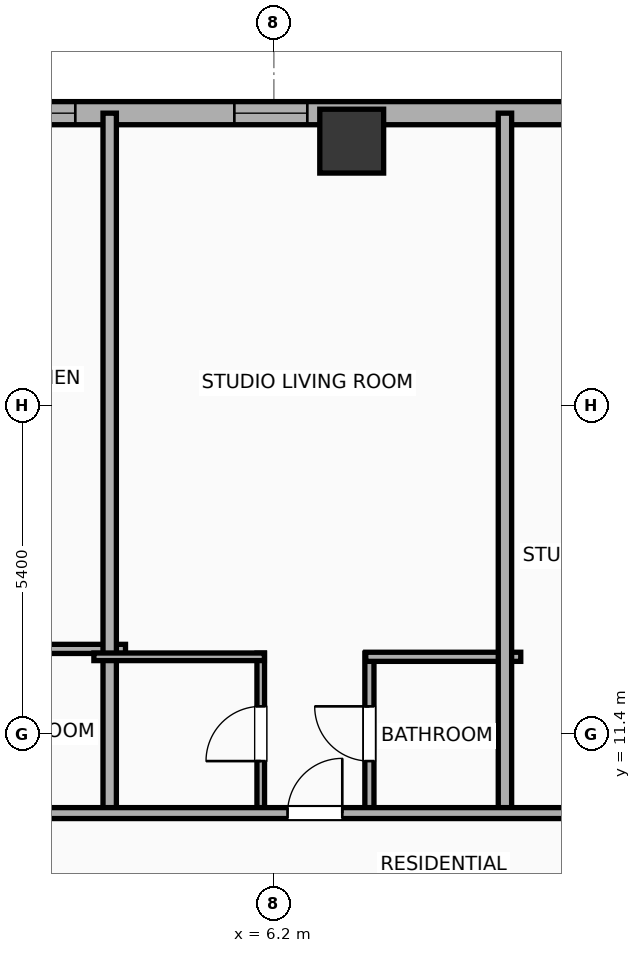
"""IFC4 building model, lengths in metres.
Left out: names, types, materials, properties, quantities, classifications, styles, units other than length and angle.
Written with IfcOpenShell. Run it as: python <this file> out.ifc"""

import sys

from ifc_helpers import new_model, si_unit, direction, frame, frame_2d, origin, origin_2d, place, context, subcontext, project, spatial, rectangle, hollow_rectangle, extrude, element, fill, save


model = new_model("IFC4")
c1 = context("Model", 3, precision=1e-05, world=origin(), true_north=direction((0.0, 1.0)))
c2 = subcontext(c1, "Body", "Model", "MODEL_VIEW")
j1 = project(units=[si_unit("LENGTHUNIT", "METRE"), si_unit("PLANEANGLEUNIT", "RADIAN")], contexts=[c1])
p1 = place(None, origin())
s1 = spatial("IfcSite", under=j1, at=p1, CompositionType="ELEMENT")
p2 = place(p1, origin())
s2 = spatial("IfcBuilding", under=s1, at=p2, CompositionType="ELEMENT")
p3 = place(p2, frame((0.0, 0.0, 128.7)))
s3 = spatial("IfcBuildingStorey", under=s2, at=p3, CompositionType="ELEMENT", Elevation=128.7)
p4 = place(p3, frame((7.48, 21.15, 0.0), z_axis=(0.0, 0.0, 1.0), x_axis=(1.0, 0.0, 0.0)))
e1 = element("IfcColumn", 1, at=p4, inside=s3, PredefinedType="COLUMN", context=c2, shape_type="SweptSolid", body=[
    extrude(hollow_rectangle(XDim=1.05, YDim=1.05, WallThickness=0.036, at=origin_2d()), origin(), (0.0, 0.0, 1.0), 3.9),
])
p5 = place(p3, frame((-25.381, 21.61, 0.0), z_axis=(0.0, 0.0, 1.0), x_axis=(1.0, 0.0, 0.0)))
e2 = element("IfcWall", 2, at=p5, inside=s3, PredefinedType="ELEMENTEDWALL", context=c2, shape_type="SweptSolid", body=[
    extrude(rectangle(XDim=54.763, YDim=0.38, at=frame_2d((27.381, 0.0))), origin(), (0.0, 0.0, 1.0), 3.65),
])
p6 = place(p5, frame((5.645, 0.0, 0.75)))
e3 = element("IfcOpeningElement", 3, at=p6, cuts=e2, PredefinedType="OPENING", context=c2, shape_type="SweptSolid", body=[
    extrude(rectangle(XDim=2.4, YDim=2.1, at=frame_2d((1.2, 1.05))), frame((0.0, 0.2, 0.0), z_axis=(0.0, -1.0, 0.0), x_axis=(1.0, 0.0, 0.0)), (0.0, 0.0, 1.0), 0.4),
])
p7 = place(p5, frame((45.067, 0.0, 0.75)))
e4 = element("IfcOpeningElement", 4, at=p7, cuts=e2, PredefinedType="OPENING", context=c2, shape_type="SweptSolid", body=[
    extrude(rectangle(XDim=2.4, YDim=2.1, at=frame_2d((1.2, 1.05))), frame((0.0, 0.2, 0.0), z_axis=(0.0, -1.0, 0.0), x_axis=(1.0, 0.0, 0.0)), (0.0, 0.0, 1.0), 0.4),
])
p8 = place(p5, frame((1.286, 0.0, 0.75)))
e5 = element("IfcOpeningElement", 5, at=p8, cuts=e2, PredefinedType="OPENING", context=c2, shape_type="SweptSolid", body=[
    extrude(rectangle(XDim=1.2, YDim=2.05, at=frame_2d((0.6, 1.025))), frame((0.0, 0.2, 0.0), z_axis=(0.0, -1.0, 0.0), x_axis=(1.0, 0.0, 0.0)), (0.0, 0.0, 1.0), 0.4),
])
p9 = place(p5, frame((3.501, 0.0, 0.75)))
e6 = element("IfcOpeningElement", 6, at=p9, cuts=e2, PredefinedType="OPENING", context=c2, shape_type="SweptSolid", body=[
    extrude(rectangle(XDim=1.2, YDim=2.05, at=frame_2d((0.6, 1.025))), frame((0.0, 0.2, 0.0), z_axis=(0.0, -1.0, 0.0), x_axis=(1.0, 0.0, 0.0)), (0.0, 0.0, 1.0), 0.4),
])
p10 = place(p5, frame((12.031, 0.0, 0.75)))
e7 = element("IfcOpeningElement", 7, at=p10, cuts=e2, PredefinedType="OPENING", context=c2, shape_type="SweptSolid", body=[
    extrude(rectangle(XDim=1.2, YDim=2.05, at=frame_2d((0.6, 1.025))), frame((0.0, 0.2, 0.0), z_axis=(0.0, -1.0, 0.0), x_axis=(1.0, 0.0, 0.0)), (0.0, 0.0, 1.0), 0.4),
])
p11 = place(p5, frame((19.805, 0.0, 0.75)))
e8 = element("IfcOpeningElement", 8, at=p11, cuts=e2, PredefinedType="OPENING", context=c2, shape_type="SweptSolid", body=[
    extrude(rectangle(XDim=1.2, YDim=2.05, at=frame_2d((0.6, 1.025))), frame((0.0, 0.2, 0.0), z_axis=(0.0, -1.0, 0.0), x_axis=(1.0, 0.0, 0.0)), (0.0, 0.0, 1.0), 0.4),
])
p12 = place(p5, frame((16.555, 0.0, 0.75)))
e9 = element("IfcOpeningElement", 9, at=p12, cuts=e2, PredefinedType="OPENING", context=c2, shape_type="SweptSolid", body=[
    extrude(rectangle(XDim=1.2, YDim=2.05, at=frame_2d((0.6, 1.025))), frame((0.0, 0.2, 0.0), z_axis=(0.0, -1.0, 0.0), x_axis=(1.0, 0.0, 0.0)), (0.0, 0.0, 1.0), 0.4),
])
p13 = place(p5, frame((23.866, 0.0, 0.75)))
e10 = element("IfcOpeningElement", 10, at=p13, cuts=e2, PredefinedType="OPENING", context=c2, shape_type="SweptSolid", body=[
    extrude(rectangle(XDim=1.2, YDim=2.05, at=frame_2d((0.6, 1.025))), frame((0.0, 0.2, 0.0), z_axis=(0.0, -1.0, 0.0), x_axis=(1.0, 0.0, 0.0)), (0.0, 0.0, 1.0), 0.4),
])
p14 = place(p5, frame((27.116, 0.0, 0.75)))
e11 = element("IfcOpeningElement", 11, at=p14, cuts=e2, PredefinedType="OPENING", context=c2, shape_type="SweptSolid", body=[
    extrude(rectangle(XDim=1.2, YDim=2.05, at=frame_2d((0.6, 1.025))), frame((0.0, 0.2, 0.0), z_axis=(0.0, -1.0, 0.0), x_axis=(1.0, 0.0, 0.0)), (0.0, 0.0, 1.0), 0.4),
])
p15 = place(p5, frame((30.931, 0.0, 0.75)))
e12 = element("IfcOpeningElement", 12, at=p15, cuts=e2, PredefinedType="OPENING", context=c2, shape_type="SweptSolid", body=[
    extrude(rectangle(XDim=1.2, YDim=2.05, at=frame_2d((0.6, 1.025))), frame((0.0, 0.2, 0.0), z_axis=(0.0, -1.0, 0.0), x_axis=(1.0, 0.0, 0.0)), (0.0, 0.0, 1.0), 0.4),
])
p16 = place(p5, frame((36.811, 0.0, 0.75)))
e13 = element("IfcOpeningElement", 13, at=p16, cuts=e2, PredefinedType="OPENING", context=c2, shape_type="SweptSolid", body=[
    extrude(rectangle(XDim=1.2, YDim=2.05, at=frame_2d((0.6, 1.025))), frame((0.0, 0.2, 0.0), z_axis=(0.0, -1.0, 0.0), x_axis=(1.0, 0.0, 0.0)), (0.0, 0.0, 1.0), 0.4),
])
p17 = place(p5, frame((40.061, 0.0, 0.75)))
e14 = element("IfcOpeningElement", 14, at=p17, cuts=e2, PredefinedType="OPENING", context=c2, shape_type="SweptSolid", body=[
    extrude(rectangle(XDim=1.2, YDim=2.05, at=frame_2d((0.6, 1.025))), frame((0.0, 0.2, 0.0), z_axis=(0.0, -1.0, 0.0), x_axis=(1.0, 0.0, 0.0)), (0.0, 0.0, 1.0), 0.4),
])
p18 = place(p5, frame((50.527, 0.0, 0.75)))
e15 = element("IfcOpeningElement", 15, at=p18, cuts=e2, PredefinedType="OPENING", context=c2, shape_type="SweptSolid", body=[
    extrude(rectangle(XDim=1.2, YDim=2.05, at=frame_2d((0.6, 1.025))), frame((0.0, 0.2, 0.0), z_axis=(0.0, -1.0, 0.0), x_axis=(1.0, 0.0, 0.0)), (0.0, 0.0, 1.0), 0.4),
])
p19 = place(p3, frame((1.089, 12.8, 0.0), z_axis=(0.0, 0.0, 1.0), x_axis=(1.0, 0.0, 0.0)))
e16 = element("IfcWall", 16, at=p19, inside=s3, PredefinedType="PLUMBINGWALL", context=c2, shape_type="SweptSolid", body=[
    extrude(rectangle(XDim=2.671, YDim=0.15, at=frame_2d((1.335, 0.0))), origin(), (0.0, 0.0, 1.0), 3.65),
])
p20 = place(p3, frame((3.5, 10.02, 0.0), z_axis=(0.0, 0.0, 1.0), x_axis=(0.0, 1.0, 0.0)))
e17 = element("IfcWall", 17, at=p20, inside=s3, PredefinedType="PARTITIONING", context=c2, shape_type="SweptSolid", body=[
    extrude(rectangle(XDim=11.59, YDim=0.22, at=frame_2d((5.795, 0.0))), origin(), (0.0, 0.0, 1.0), 3.65),
])
p21 = place(p3, frame((5.984, 10.08, 0.0), z_axis=(0.0, 0.0, 1.0), x_axis=(0.0, 1.0, 0.0)))
e18 = element("IfcWall", 18, at=p21, inside=s3, PredefinedType="PARTITIONING", context=c2, shape_type="SweptSolid", body=[
    extrude(rectangle(XDim=2.65, YDim=0.125, at=frame_2d((1.325, 0.0))), origin(), (0.0, 0.0, 1.0), 3.65),
])
p22 = place(p21, frame((0.875, 0.0, 0.0)))
e19 = element("IfcOpeningElement", 19, at=p22, cuts=e18, PredefinedType="OPENING", context=c2, shape_type="SweptSolid", body=[
    extrude(rectangle(XDim=0.9, YDim=2.05, at=frame_2d((0.45, 1.025))), frame((0.0, 0.073, 0.0), z_axis=(0.0, -1.0, 0.0), x_axis=(1.0, 0.0, 0.0)), (0.0, 0.0, 1.0), 0.145),
])
p23 = place(p3, frame((7.771, 10.08, 0.0), z_axis=(0.0, 0.0, 1.0), x_axis=(0.0, 1.0, 0.0)))
e20 = element("IfcWall", 20, at=p23, inside=s3, PredefinedType="PLUMBINGWALL", context=c2, shape_type="SweptSolid", body=[
    extrude(rectangle(XDim=2.65, YDim=0.15, at=frame_2d((1.325, 0.0))), origin(), (0.0, 0.0, 1.0), 3.65),
])
p24 = place(p23, frame((0.875, 0.0, 0.0)))
e21 = element("IfcOpeningElement", 21, at=p24, cuts=e20, PredefinedType="OPENING", context=c2, shape_type="SweptSolid", body=[
    extrude(rectangle(XDim=0.9, YDim=2.05, at=frame_2d((0.45, 1.025))), frame((0.0, 0.085, 0.0), z_axis=(0.0, -1.0, 0.0), x_axis=(1.0, 0.0, 0.0)), (0.0, 0.0, 1.0), 0.17),
])
p25 = place(p3, frame((3.24, 12.67, 0.0), z_axis=(0.0, 0.0, 1.0), x_axis=(1.0, 0.0, 0.0)))
e22 = element("IfcWall", 22, at=p25, inside=s3, PredefinedType="PARTITIONING", context=c2, shape_type="SweptSolid", body=[
    extrude(rectangle(XDim=2.804, YDim=0.125, at=frame_2d((1.402, 0.0))), origin(), (0.0, 0.0, 1.0), 3.65),
])
p26 = place(p3, frame((7.711, 12.67, 0.0), z_axis=(0.0, 0.0, 1.0), x_axis=(1.0, 0.0, 0.0)))
e23 = element("IfcWall", 23, at=p26, inside=s3, PredefinedType="PLUMBINGWALL", context=c2, shape_type="SweptSolid", body=[
    extrude(rectangle(XDim=2.549, YDim=0.15, at=frame_2d((1.274, 0.0))), origin(), (0.0, 0.0, 1.0), 3.65),
])
p27 = place(p3, frame((10.0, 10.02, 0.0), z_axis=(0.0, 0.0, 1.0), x_axis=(0.0, 1.0, 0.0)))
e24 = element("IfcWall", 24, at=p27, inside=s3, PredefinedType="PARTITIONING", context=c2, shape_type="SweptSolid", body=[
    extrude(rectangle(XDim=11.59, YDim=0.22, at=frame_2d((5.795, 0.0))), origin(), (0.0, 0.0, 1.0), 3.65),
])
p28 = place(p3, frame((-29.21, 10.1, 0.0), z_axis=(0.0, 0.0, 1.0), x_axis=(1.0, 0.0, 0.0)))
e25 = element("IfcWall", 25, at=p28, inside=s3, PredefinedType="PARTITIONING", context=c2, shape_type="SweptSolid", body=[
    extrude(rectangle(XDim=62.42, YDim=0.18, at=frame_2d((31.21, 0.0))), origin(), (0.0, 0.0, 1.0), 3.65),
])
p29 = place(p28, frame((3.033, 0.0, 0.0)))
e26 = element("IfcOpeningElement", 26, at=p29, cuts=e25, PredefinedType="OPENING", context=c2, shape_type="SweptSolid", body=[
    extrude(rectangle(XDim=0.9, YDim=2.05, at=frame_2d((0.45, 1.025))), frame((0.0, 0.1, 0.0), z_axis=(0.0, -1.0, 0.0), x_axis=(1.0, 0.0, 0.0)), (0.0, 0.0, 1.0), 0.2),
])
p30 = place(p28, frame((10.573, 0.0, 0.0)))
e27 = element("IfcOpeningElement", 27, at=p30, cuts=e25, PredefinedType="OPENING", context=c2, shape_type="SweptSolid", body=[
    extrude(rectangle(XDim=1.15, YDim=2.05, at=frame_2d((0.575, 1.025))), frame((0.0, 0.1, 0.0), z_axis=(0.0, -1.0, 0.0), x_axis=(1.0, 0.0, 0.0)), (0.0, 0.0, 1.0), 0.2),
])
p31 = place(p28, frame((16.135, 0.0, 0.0)))
e28 = element("IfcOpeningElement", 28, at=p31, cuts=e25, PredefinedType="OPENING", context=c2, shape_type="SweptSolid", body=[
    extrude(rectangle(XDim=0.9, YDim=2.05, at=frame_2d((0.45, 1.025))), frame((0.0, 0.1, 0.0), z_axis=(0.0, -1.0, 0.0), x_axis=(1.0, 0.0, 0.0)), (0.0, 0.0, 1.0), 0.2),
])
p32 = place(p28, frame((23.632, 0.0, 0.0)))
e29 = element("IfcOpeningElement", 29, at=p32, cuts=e25, PredefinedType="OPENING", context=c2, shape_type="SweptSolid", body=[
    extrude(rectangle(XDim=1.15, YDim=2.05, at=frame_2d((0.575, 1.025))), frame((0.0, 0.1, 0.0), z_axis=(0.0, -1.0, 0.0), x_axis=(1.0, 0.0, 0.0)), (0.0, 0.0, 1.0), 0.2),
])
p33 = place(p28, frame((27.751, 0.0, 0.0)))
e30 = element("IfcOpeningElement", 30, at=p33, cuts=e25, PredefinedType="OPENING", context=c2, shape_type="SweptSolid", body=[
    extrude(rectangle(XDim=1.15, YDim=2.05, at=frame_2d((0.575, 1.025))), frame((0.0, 0.1, 0.0), z_axis=(0.0, -1.0, 0.0), x_axis=(1.0, 0.0, 0.0)), (0.0, 0.0, 1.0), 0.2),
])
p34 = place(p28, frame((35.635, 0.0, 0.0)))
e31 = element("IfcOpeningElement", 31, at=p34, cuts=e25, PredefinedType="OPENING", context=c2, shape_type="SweptSolid", body=[
    extrude(rectangle(XDim=0.9, YDim=2.05, at=frame_2d((0.45, 1.025))), frame((0.0, 0.1, 0.0), z_axis=(0.0, -1.0, 0.0), x_axis=(1.0, 0.0, 0.0)), (0.0, 0.0, 1.0), 0.2),
])
p35 = place(p28, frame((40.697, 0.0, 0.0)))
e32 = element("IfcOpeningElement", 32, at=p35, cuts=e25, PredefinedType="OPENING", context=c2, shape_type="SweptSolid", body=[
    extrude(rectangle(XDim=1.15, YDim=2.05, at=frame_2d((0.575, 1.025))), frame((0.0, 0.1, 0.0), z_axis=(0.0, -1.0, 0.0), x_axis=(1.0, 0.0, 0.0)), (0.0, 0.0, 1.0), 0.2),
])
p36 = place(p28, frame((48.637, 0.0, 0.0)))
e33 = element("IfcOpeningElement", 33, at=p36, cuts=e25, PredefinedType="OPENING", context=c2, shape_type="SweptSolid", body=[
    extrude(rectangle(XDim=0.9, YDim=2.05, at=frame_2d((0.45, 1.025))), frame((0.0, 0.1, 0.0), z_axis=(0.0, -1.0, 0.0), x_axis=(1.0, 0.0, 0.0)), (0.0, 0.0, 1.0), 0.2),
])
p37 = place(p28, frame((57.213, 0.0, 0.0)))
e34 = element("IfcOpeningElement", 34, at=p37, cuts=e25, PredefinedType="OPENING", context=c2, shape_type="SweptSolid", body=[
    extrude(rectangle(XDim=1.15, YDim=2.05, at=frame_2d((0.575, 1.025))), frame((0.0, 0.1, 0.0), z_axis=(0.0, -1.0, 0.0), x_axis=(1.0, 0.0, 0.0)), (0.0, 0.0, 1.0), 0.2),
])
p38 = place(p14, origin())
e35 = element("IfcWindow", 35, at=p38, inside=s3, PartitioningType="SINGLE_PANEL", PredefinedType="WINDOW", context=c2, shape_type="SweptSolid", body=[
    extrude(rectangle(XDim=1.2, YDim=2.05, at=frame_2d((0.6, 1.025))), frame((0.0, 0.03, 0.0), z_axis=(0.0, -1.0, 0.0), x_axis=(1.0, 0.0, 0.0)), (0.0, 0.0, 1.0), 0.06),
])
fill(e11, e35)
p39 = place(p15, origin())
e36 = element("IfcWindow", 36, at=p39, inside=s3, PartitioningType="SINGLE_PANEL", PredefinedType="WINDOW", context=c2, shape_type="SweptSolid", body=[
    extrude(rectangle(XDim=1.2, YDim=2.05, at=frame_2d((0.6, 1.025))), frame((0.0, 0.03, 0.0), z_axis=(0.0, -1.0, 0.0), x_axis=(1.0, 0.0, 0.0)), (0.0, 0.0, 1.0), 0.06),
])
fill(e12, e36)
p40 = place(p22, origin())
e37 = element("IfcDoor", 37, at=p40, inside=s3, OperationType="SINGLE_SWING_LEFT", PredefinedType="DOOR", context=c2, shape_type="SweptSolid", body=[
    extrude(rectangle(XDim=0.9, YDim=2.05, at=frame_2d((0.45, 1.025))), frame((0.0, 0.025, 0.0), z_axis=(0.0, -1.0, 0.0), x_axis=(1.0, 0.0, 0.0)), (0.0, 0.0, 1.0), 0.05),
])
fill(e19, e37)
p41 = place(p24, origin())
e38 = element("IfcDoor", 38, at=p41, inside=s3, OperationType="SINGLE_SWING_RIGHT", PredefinedType="DOOR", context=c2, shape_type="SweptSolid", body=[
    extrude(rectangle(XDim=0.9, YDim=2.05, at=frame_2d((0.45, 1.025))), frame((0.0, 0.025, 0.0), z_axis=(0.0, -1.0, 0.0), x_axis=(1.0, 0.0, 0.0)), (0.0, 0.0, 1.0), 0.05),
])
fill(e21, e38)
p42 = place(p34, origin())
e39 = element("IfcDoor", 39, at=p42, inside=s3, OperationType="SINGLE_SWING_RIGHT", PredefinedType="DOOR", context=c2, shape_type="SweptSolid", body=[
    extrude(rectangle(XDim=0.9, YDim=2.05, at=frame_2d((0.45, 1.025))), frame((0.0, 0.025, 0.0), z_axis=(0.0, -1.0, 0.0), x_axis=(1.0, 0.0, 0.0)), (0.0, 0.0, 1.0), 0.05),
])
fill(e31, e39)
save(model, sys.argv[1])
